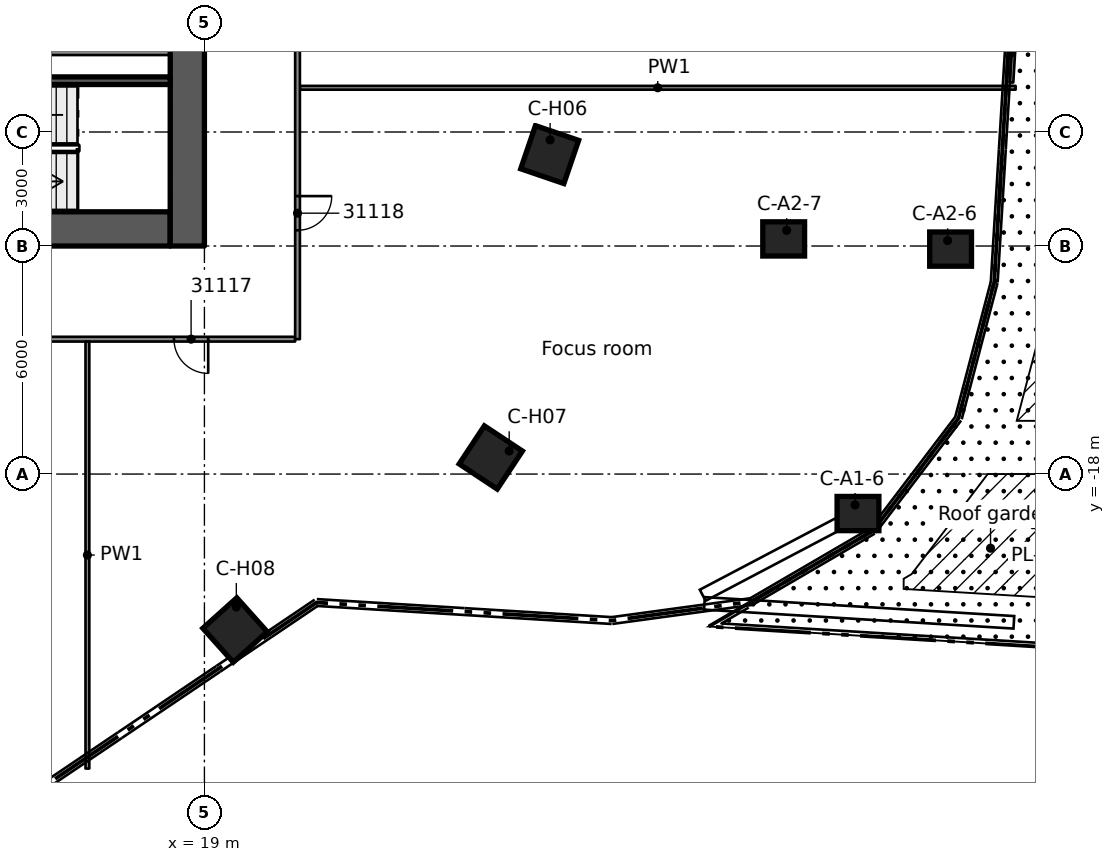
"""IFC4 building model, lengths in metres.
Left out: names, types, materials, properties, quantities, classifications, styles, units other than length and angle.
Written with IfcOpenShell. Run it as: python <this file> out.ifc"""

import sys

from ifc_helpers import new_model, si_unit, direction, frame, frame_2d, origin, origin_2d, place, context, subcontext, project, spatial, rectangle, extrude, element, fill, save


model = new_model("IFC4")
c1 = context("Model", 3, precision=1e-05, world=origin(), true_north=direction((0.0, 1.0)))
c2 = subcontext(c1, "Body", "Model", "MODEL_VIEW")
j1 = project(units=[si_unit("LENGTHUNIT", "METRE"), si_unit("PLANEANGLEUNIT", "RADIAN")], contexts=[c1])
p1 = place(None, origin())
s1 = spatial("IfcSite", under=j1, at=p1, CompositionType="ELEMENT")
p2 = place(p1, origin())
s2 = spatial("IfcBuilding", under=s1, at=p2, CompositionType="ELEMENT")
p3 = place(p2, frame((0.0, 0.0, 156.1)))
s3 = spatial("IfcBuildingStorey", under=s2, at=p3, CompositionType="ELEMENT", Elevation=156.1)
p4 = place(p3, frame((8.9, -11.55, 0.0), z_axis=(0.0, 0.0, 1.0), x_axis=(1.0, 0.0, 0.0)))
e1 = element("IfcWall", 1, at=p4, inside=s3, PredefinedType="SHEAR", context=c2, shape_type="SweptSolid", body=[
    extrude(rectangle(XDim=9.2, YDim=0.9, at=frame_2d((4.6, 0.0))), origin(), (0.0, 0.0, 1.0), 3.5),
])
p5 = place(p4, frame((3.0, 0.0, 0.0)))
e2 = element("IfcOpeningElement", 2, at=p5, cuts=e1, PredefinedType="OPENING", context=c2, shape_type="SweptSolid", body=[
    extrude(rectangle(XDim=1.1, YDim=2.1, at=frame_2d((0.55, 1.05))), frame((0.0, 0.46, 0.0), z_axis=(0.0, -1.0, 0.0), x_axis=(1.0, 0.0, 0.0)), (0.0, 0.0, 1.0), 0.92),
])
p6 = place(p3, frame((18.55, -12.0, 0.0), z_axis=(0.0, 0.0, 1.0), x_axis=(0.0, 1.0, 0.0)))
e3 = element("IfcWall", 3, at=p6, inside=s3, PredefinedType="SHEAR", context=c2, shape_type="SweptSolid", body=[
    extrude(rectangle(XDim=24.0, YDim=0.9, at=frame_2d((12.0, 0.0))), origin(), (0.0, 0.0, 1.0), 3.5),
])
p7 = place(p6, frame((12.1, 0.0, 0.0)))
e4 = element("IfcOpeningElement", 4, at=p7, cuts=e3, PredefinedType="OPENING", context=c2, shape_type="SweptSolid", body=[
    extrude(rectangle(XDim=1.8, YDim=2.1, at=frame_2d((0.9, 1.05))), frame((0.0, 0.46, 0.0), z_axis=(0.0, -1.0, 0.0), x_axis=(1.0, 0.0, 0.0)), (0.0, 0.0, 1.0), 0.92),
])
for number, where, z_axis, x_axis in (
    (5, (36.198, -19.039, 0.0), (0.0, 0.0, 1.0), (1.0, 0.0, 0.0)),
    (6, (38.635, -12.081, 0.0), (0.0, 0.0, 1.0), (1.0, 0.0, 0.0)),
    (7, (34.243, -11.813, 0.0), (0.0, 0.0, 1.0), (1.0, 0.0, 0.0)),
):
    element("IfcColumn", number, at=place(p3, frame(where, z_axis=z_axis, x_axis=x_axis)), inside=s3, PredefinedType="COLUMN", context=c2, shape_type="SweptSolid", body=[
        extrude(rectangle(XDim=1.1, YDim=0.9, at=origin_2d()), origin(), (0.0, 0.0, 1.0), 3.5),
    ])
for number, where, z_axis, x_axis in (
    (8, (28.085, -9.594, 0.0), (0.0, 0.0, 1.0), (0.946, -0.323, 0.0)),
    (9, (26.536, -17.564, 0.0), (0.0, 0.0, 1.0), (0.834, -0.552, 0.0)),
    (10, (19.806, -22.104, 0.0), (0.0, 0.0, 1.0), (0.667, -0.745, 0.0)),
):
    element("IfcColumn", number, at=place(p3, frame(where, z_axis=z_axis, x_axis=x_axis)), inside=s3, PredefinedType="COLUMN", context=c2, shape_type="SweptSolid", body=[
        extrude(rectangle(XDim=1.2, YDim=1.2, at=origin_2d()), origin(), (0.0, 0.0, 1.0), 3.5),
    ])
for number, where, z_axis, x_axis in (
    (11, (11.54, -6.875, 0.0), (0.0, 0.0, 1.0), (1.0, 0.0, 0.0)),
    (12, (11.54, -7.65, 0.0), (0.0, 0.0, 1.0), (1.0, 0.0, 0.0)),
):
    element("IfcWall", number, at=place(p3, frame(where, z_axis=z_axis, x_axis=x_axis)), inside=s3, PredefinedType="SOLIDWALL", context=c2, shape_type="SweptSolid", body=[
        extrude(rectangle(XDim=6.56, YDim=0.2, at=frame_2d((3.28, 0.0))), origin(), (0.0, 0.0, 1.0), 3.09),
    ])
p8 = place(p3, frame((40.552, -2.505, 0.0), z_axis=(0.0, 0.0, 1.0), x_axis=(-0.061033697925, -0.998135706063, 0.0)))
e13 = element("IfcWall", 13, at=p8, inside=s3, PredefinedType="STANDARD", context=c2, shape_type="SweptSolid", body=[
    extrude(rectangle(XDim=5.2, YDim=0.1, at=frame_2d((2.6, 0.0))), origin(), (0.0, 0.0, 1.0), 3.1),
])
p9 = place(p8, frame((1.7, 0.0, 0.0)))
e14 = element("IfcOpeningElement", 14, at=p9, cuts=e13, PredefinedType="OPENING", context=c2, shape_type="SweptSolid", body=[
    extrude(rectangle(XDim=1.8, YDim=2.4, at=frame_2d((0.9, 1.2))), frame((0.0, 0.06, 0.0), z_axis=(0.0, -1.0, 0.0), x_axis=(1.0, 0.0, 0.0)), (0.0, 0.0, 1.0), 0.12),
])
p10 = place(p8, frame((0.7, 0.0, 0.0)))
e15 = element("IfcOpeningElement", 15, at=p10, cuts=e13, PredefinedType="OPENING", context=c2, shape_type="SweptSolid", body=[
    extrude(rectangle(XDim=0.9, YDim=2.4, at=frame_2d((0.45, 1.2))), frame((0.0, 0.06, 0.0), z_axis=(0.0, -1.0, 0.0), x_axis=(1.0, 0.0, 0.0)), (0.0, 0.0, 1.0), 0.12),
])
p11 = place(p8, frame((3.6, 0.0, 0.0)))
e16 = element("IfcOpeningElement", 16, at=p11, cuts=e13, PredefinedType="OPENING", context=c2, shape_type="SweptSolid", body=[
    extrude(rectangle(XDim=0.9, YDim=2.4, at=frame_2d((0.45, 1.2))), frame((0.0, 0.06, 0.0), z_axis=(0.0, -1.0, 0.0), x_axis=(1.0, 0.0, 0.0)), (0.0, 0.0, 1.0), 0.12),
])
p12 = place(p3, frame((21.387, -14.451, 0.0), z_axis=(0.0, 0.0, 1.0), x_axis=(-1.0, 0.0, 0.0)))
e17 = element("IfcWall", 17, at=p12, inside=s3, PredefinedType="PARTITIONING", context=c2, shape_type="SweptSolid", body=[
    extrude(rectangle(XDim=10.996, YDim=0.125, at=frame_2d((5.498, 0.0))), origin(), (0.0, 0.0, 1.0), 3.08),
])
p13 = place(p12, frame((7.816, 0.0, 0.0)))
e18 = element("IfcOpeningElement", 18, at=p13, cuts=e17, PredefinedType="OPENING", context=c2, shape_type="SweptSolid", body=[
    extrude(rectangle(XDim=0.9, YDim=2.1, at=frame_2d((0.45, 1.05))), frame((0.0, 0.073, 0.0), z_axis=(0.0, -1.0, 0.0), x_axis=(1.0, 0.0, 0.0)), (0.0, 0.0, 1.0), 0.145),
])
p14 = place(p12, frame((2.288, 0.0, 0.0)))
e19 = element("IfcOpeningElement", 19, at=p14, cuts=e17, PredefinedType="OPENING", context=c2, shape_type="SweptSolid", body=[
    extrude(rectangle(XDim=0.9, YDim=2.1, at=frame_2d((0.45, 1.05))), frame((0.0, 0.073, 0.0), z_axis=(0.0, -1.0, 0.0), x_axis=(1.0, 0.0, 0.0)), (0.0, 0.0, 1.0), 0.145),
])
p15 = place(p3, frame((21.512, -7.836, 0.0), z_axis=(0.0, 0.0, 1.0), x_axis=(1.0, 0.0, 0.0)))
e20 = element("IfcWall", 20, at=p15, inside=s3, PredefinedType="PARTITIONING", context=c2, shape_type="SweptSolid", body=[
    extrude(rectangle(XDim=18.834, YDim=0.1, at=frame_2d((9.417, 0.0))), origin(), (0.0, 0.0, 1.0), 3.08),
])
p16 = place(p3, frame((21.45, 14.451, 0.0), z_axis=(0.0, 0.0, 1.0), x_axis=(0.0, -1.0, 0.0)))
e21 = element("IfcWall", 21, at=p16, inside=s3, PredefinedType="PARTITIONING", context=c2, shape_type="SweptSolid", body=[
    extrude(rectangle(XDim=28.902, YDim=0.125, at=frame_2d((14.451, 0.0))), origin(), (0.0, 0.0, 1.0), 3.08),
])
p17 = place(p16, frame((25.137, 0.0, 0.0)))
e22 = element("IfcOpeningElement", 22, at=p17, cuts=e21, PredefinedType="OPENING", context=c2, shape_type="SweptSolid", body=[
    extrude(rectangle(XDim=0.9, YDim=2.1, at=frame_2d((0.45, 1.05))), frame((0.0, 0.073, 0.0), z_axis=(0.0, -1.0, 0.0), x_axis=(1.0, 0.0, 0.0)), (0.0, 0.0, 1.0), 0.145),
])
p18 = place(p16, frame((18.025, 0.0, 0.0)))
e23 = element("IfcOpeningElement", 23, at=p18, cuts=e21, PredefinedType="OPENING", context=c2, shape_type="SweptSolid", body=[
    extrude(rectangle(XDim=1.8, YDim=2.1, at=frame_2d((0.9, 1.05))), frame((0.0, 0.073, 0.0), z_axis=(0.0, -1.0, 0.0), x_axis=(1.0, 0.0, 0.0)), (0.0, 0.0, 1.0), 0.145),
])
p19 = place(p16, frame((11.413, 0.0, 0.0)))
e24 = element("IfcOpeningElement", 24, at=p19, cuts=e21, PredefinedType="OPENING", context=c2, shape_type="SweptSolid", body=[
    extrude(rectangle(XDim=1.8, YDim=2.1, at=frame_2d((0.9, 1.05))), frame((0.0, 0.073, 0.0), z_axis=(0.0, -1.0, 0.0), x_axis=(1.0, 0.0, 0.0)), (0.0, 0.0, 1.0), 0.145),
])
p20 = place(p16, frame((4.801, 0.0, 0.0)))
e25 = element("IfcOpeningElement", 25, at=p20, cuts=e21, PredefinedType="OPENING", context=c2, shape_type="SweptSolid", body=[
    extrude(rectangle(XDim=1.8, YDim=2.1, at=frame_2d((0.9, 1.05))), frame((0.0, 0.073, 0.0), z_axis=(0.0, -1.0, 0.0), x_axis=(1.0, 0.0, 0.0)), (0.0, 0.0, 1.0), 0.145),
])
p21 = place(p3, frame((15.921, -25.749, 0.0), z_axis=(0.0, 0.0, 1.0), x_axis=(0.0, 1.0, 0.0)))
e26 = element("IfcWall", 26, at=p21, inside=s3, PredefinedType="PARTITIONING", context=c2, shape_type="SweptSolid", body=[
    extrude(rectangle(XDim=11.235, YDim=0.1, at=frame_2d((5.618, 0.0))), origin(), (0.0, 0.0, 1.0), 3.08),
])
p22 = place(p11, origin())
e27 = element("IfcWindow", 27, at=p22, inside=s3, PartitioningType="SINGLE_PANEL", PredefinedType="WINDOW", context=c2, shape_type="SweptSolid", body=[
    extrude(rectangle(XDim=0.9, YDim=2.4, at=frame_2d((0.45, 1.2))), frame((0.0, 0.03, 0.0), z_axis=(0.0, -1.0, 0.0), x_axis=(1.0, 0.0, 0.0)), (0.0, 0.0, 1.0), 0.06),
])
fill(e16, e27)
p23 = place(p14, origin())
e28 = element("IfcDoor", 28, at=p23, inside=s3, OperationType="SINGLE_SWING_LEFT", PredefinedType="DOOR", context=c2, shape_type="SweptSolid", body=[
    extrude(rectangle(XDim=0.9, YDim=2.1, at=frame_2d((0.45, 1.05))), frame((0.0, 0.025, 0.0), z_axis=(0.0, -1.0, 0.0), x_axis=(1.0, 0.0, 0.0)), (0.0, 0.0, 1.0), 0.05),
])
fill(e19, e28)
p24 = place(p17, origin())
e29 = element("IfcDoor", 29, at=p24, inside=s3, OperationType="SINGLE_SWING_RIGHT", PredefinedType="DOOR", context=c2, shape_type="SweptSolid", body=[
    extrude(rectangle(XDim=0.9, YDim=2.1, at=frame_2d((0.45, 1.05))), frame((0.0, 0.025, 0.0), z_axis=(0.0, -1.0, 0.0), x_axis=(1.0, 0.0, 0.0)), (0.0, 0.0, 1.0), 0.05),
])
fill(e22, e29)
save(model, sys.argv[1])
